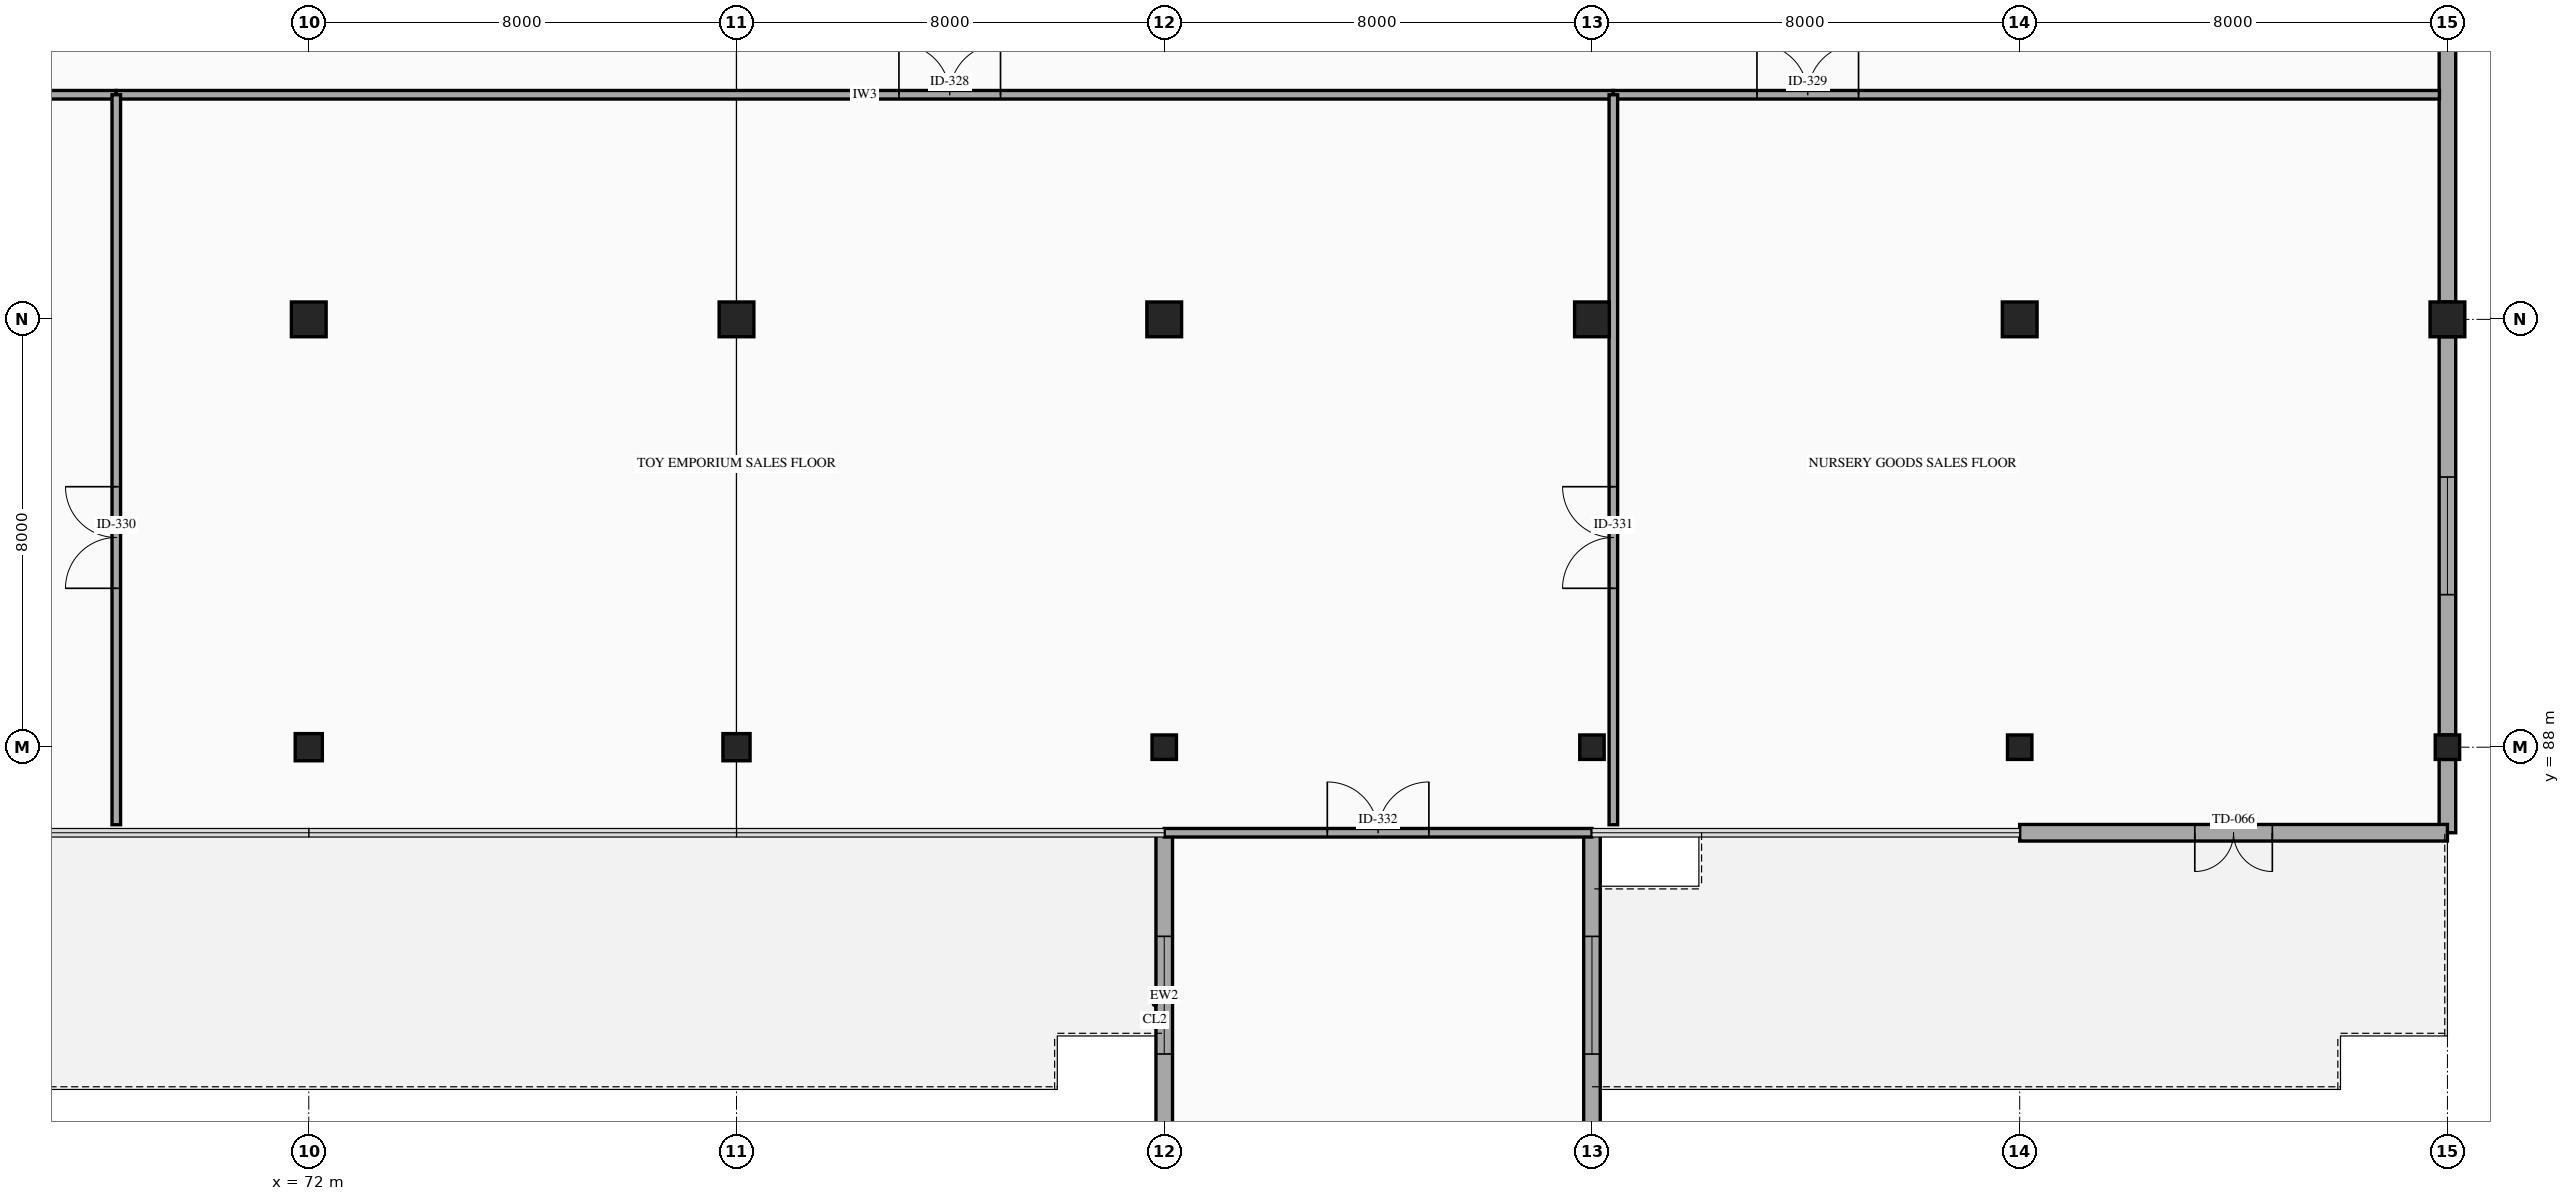
"""IFC4 building model, lengths in metres.
Left out: names, types, materials, properties, quantities, classifications, styles, units other than length and angle.
Written with IfcOpenShell. Run it as: python <this file> out.ifc"""

import sys

from ifc_helpers import new_model, si_unit, direction, frame, frame_2d, origin, origin_2d, place, context, subcontext, project, spatial, rectangle, hollow_circle, extrude, element, fill, save


model = new_model("IFC4")
c1 = context("Model", 3, precision=1e-05, world=origin(), true_north=direction((0.0, 1.0)))
c2 = subcontext(c1, "Body", "Model", "MODEL_VIEW")
j1 = project(units=[si_unit("LENGTHUNIT", "METRE"), si_unit("PLANEANGLEUNIT", "RADIAN")], contexts=[c1])
p1 = place(None, origin())
s1 = spatial("IfcSite", under=j1, at=p1, CompositionType="ELEMENT")
p2 = place(p1, origin())
s2 = spatial("IfcBuilding", under=s1, at=p2, CompositionType="ELEMENT")
p3 = place(p2, frame((0.0, 0.0, 14.9)))
s3 = spatial("IfcBuildingStorey", under=s2, at=p3, CompositionType="ELEMENT", Elevation=14.9)
p4 = place(p3, frame((72.0, 88.0, 0.0), z_axis=(0.0, 0.0, 1.0), x_axis=(1.0, 0.0, 0.0)))
e1 = element("IfcColumn", 1, at=p4, inside=s3, PredefinedType="COLUMN", context=c2, shape_type="SweptSolid", body=[
    extrude(hollow_circle(Radius=0.254, WallThickness=0.012, at=origin_2d()), origin(), (0.0, 0.0, 1.0), 4.5),
])
p5 = place(p3, frame((72.0, 96.0, 0.0), z_axis=(0.0, 0.0, 1.0), x_axis=(1.0, 0.0, 0.0)))
e2 = element("IfcColumn", 2, at=p5, inside=s3, PredefinedType="COLUMN", context=c2, shape_type="SweptSolid", body=[
    extrude(rectangle(XDim=0.65, YDim=0.65, at=origin_2d()), origin(), (0.0, 0.0, 1.0), 4.5),
])
p6 = place(p3, frame((80.0, 88.0, 0.0), z_axis=(0.0, 0.0, 1.0), x_axis=(1.0, 0.0, 0.0)))
e3 = element("IfcColumn", 3, at=p6, inside=s3, PredefinedType="COLUMN", context=c2, shape_type="SweptSolid", body=[
    extrude(hollow_circle(Radius=0.254, WallThickness=0.012, at=origin_2d()), origin(), (0.0, 0.0, 1.0), 4.5),
])
p7 = place(p3, frame((80.0, 96.0, 0.0), z_axis=(0.0, 0.0, 1.0), x_axis=(1.0, 0.0, 0.0)))
e4 = element("IfcColumn", 4, at=p7, inside=s3, PredefinedType="COLUMN", context=c2, shape_type="SweptSolid", body=[
    extrude(rectangle(XDim=0.65, YDim=0.65, at=origin_2d()), origin(), (0.0, 0.0, 1.0), 4.5),
])
p8 = place(p3, frame((88.0, 88.0, 0.0), z_axis=(0.0, 0.0, 1.0), x_axis=(1.0, 0.0, 0.0)))
e5 = element("IfcColumn", 5, at=p8, inside=s3, PredefinedType="COLUMN", context=c2, shape_type="SweptSolid", body=[
    extrude(hollow_circle(Radius=0.229, WallThickness=0.012, at=origin_2d()), origin(), (0.0, 0.0, 1.0), 4.5),
])
p9 = place(p3, frame((88.0, 96.0, 0.0), z_axis=(0.0, 0.0, 1.0), x_axis=(1.0, 0.0, 0.0)))
e6 = element("IfcColumn", 6, at=p9, inside=s3, PredefinedType="COLUMN", context=c2, shape_type="SweptSolid", body=[
    extrude(rectangle(XDim=0.65, YDim=0.65, at=origin_2d()), origin(), (0.0, 0.0, 1.0), 4.5),
])
p10 = place(p3, frame((96.0, 88.0, 0.0), z_axis=(0.0, 0.0, 1.0), x_axis=(1.0, 0.0, 0.0)))
e7 = element("IfcColumn", 7, at=p10, inside=s3, PredefinedType="COLUMN", context=c2, shape_type="SweptSolid", body=[
    extrude(hollow_circle(Radius=0.229, WallThickness=0.012, at=origin_2d()), origin(), (0.0, 0.0, 1.0), 4.5),
])
p11 = place(p3, frame((96.0, 96.0, 0.0), z_axis=(0.0, 0.0, 1.0), x_axis=(1.0, 0.0, 0.0)))
e8 = element("IfcColumn", 8, at=p11, inside=s3, PredefinedType="COLUMN", context=c2, shape_type="SweptSolid", body=[
    extrude(rectangle(XDim=0.65, YDim=0.65, at=origin_2d()), origin(), (0.0, 0.0, 1.0), 4.5),
])
p12 = place(p3, frame((104.0, 88.0, 0.0), z_axis=(0.0, 0.0, 1.0), x_axis=(1.0, 0.0, 0.0)))
e9 = element("IfcColumn", 9, at=p12, inside=s3, PredefinedType="COLUMN", context=c2, shape_type="SweptSolid", body=[
    extrude(hollow_circle(Radius=0.229, WallThickness=0.012, at=origin_2d()), origin(), (0.0, 0.0, 1.0), 4.5),
])
p13 = place(p3, frame((104.0, 96.0, 0.0), z_axis=(0.0, 0.0, 1.0), x_axis=(1.0, 0.0, 0.0)))
e10 = element("IfcColumn", 10, at=p13, inside=s3, PredefinedType="COLUMN", context=c2, shape_type="SweptSolid", body=[
    extrude(rectangle(XDim=0.65, YDim=0.65, at=origin_2d()), origin(), (0.0, 0.0, 1.0), 4.5),
])
p14 = place(p3, frame((112.0, 88.0, 0.0), z_axis=(0.0, 0.0, 1.0), x_axis=(1.0, 0.0, 0.0)))
e11 = element("IfcColumn", 11, at=p14, inside=s3, PredefinedType="COLUMN", context=c2, shape_type="SweptSolid", body=[
    extrude(hollow_circle(Radius=0.229, WallThickness=0.012, at=origin_2d()), origin(), (0.0, 0.0, 1.0), 4.5),
])
p15 = place(p3, frame((112.0, 96.0, 0.0), z_axis=(0.0, 0.0, 1.0), x_axis=(1.0, 0.0, 0.0)))
e12 = element("IfcColumn", 12, at=p15, inside=s3, PredefinedType="COLUMN", context=c2, shape_type="SweptSolid", body=[
    extrude(rectangle(XDim=0.65, YDim=0.65, at=origin_2d()), origin(), (0.0, 0.0, 1.0), 4.5),
])
p16 = place(p3, frame((88.0, 80.325, 0.0), z_axis=(0.0, 0.0, 1.0), x_axis=(0.0, 1.0, 0.0)))
e13 = element("IfcWall", 13, at=p16, inside=s3, PredefinedType="STANDARD", context=c2, shape_type="SweptSolid", body=[
    extrude(rectangle(XDim=6.075, YDim=0.31, at=frame_2d((3.038, 0.0))), origin(), (0.0, 0.0, 1.0), 3.48),
])
p17 = place(p16, frame((1.938, 0.0, 0.8)))
e14 = element("IfcOpeningElement", 14, at=p17, cuts=e13, PredefinedType="OPENING", context=c2, shape_type="SweptSolid", body=[
    extrude(rectangle(XDim=2.2, YDim=2.05, at=frame_2d((1.1, 1.025))), frame((0.0, 0.165, 0.0), z_axis=(0.0, -1.0, 0.0), x_axis=(1.0, 0.0, 0.0)), (0.0, 0.0, 1.0), 0.33),
])
p18 = place(p3, frame((112.0, 103.675, 0.0), z_axis=(0.0, 0.0, 1.0), x_axis=(0.0, -1.0, 0.0)))
e15 = element("IfcWall", 15, at=p18, inside=s3, PredefinedType="STANDARD", context=c2, shape_type="SweptSolid", body=[
    extrude(rectangle(XDim=7.35, YDim=0.31, at=frame_2d((3.675, 0.0))), origin(), (0.0, 0.0, 1.0), 3.48),
])
p19 = place(p3, frame((112.0, 95.675, 0.0), z_axis=(0.0, 0.0, 1.0), x_axis=(0.0, -1.0, 0.0)))
e16 = element("IfcWall", 16, at=p19, inside=s3, PredefinedType="STANDARD", context=c2, shape_type="SweptSolid", body=[
    extrude(rectangle(XDim=7.447, YDim=0.31, at=frame_2d((3.723, 0.0))), origin(), (0.0, 0.0, 1.0), 3.48),
])
p20 = place(p19, frame((2.623, 0.0, 0.8)))
e17 = element("IfcOpeningElement", 17, at=p20, cuts=e16, PredefinedType="OPENING", context=c2, shape_type="SweptSolid", body=[
    extrude(rectangle(XDim=2.2, YDim=2.05, at=frame_2d((1.1, 1.025))), frame((0.0, 0.165, 0.0), z_axis=(0.0, -1.0, 0.0), x_axis=(1.0, 0.0, 0.0)), (0.0, 0.0, 1.0), 0.33),
])
p21 = place(p3, frame((112.0, 87.771, 0.0), z_axis=(0.0, 0.0, 1.0), x_axis=(0.0, -1.0, 0.0)))
e18 = element("IfcWall", 18, at=p21, inside=s3, PredefinedType="STANDARD", context=c2, shape_type="SweptSolid", body=[
    extrude(rectangle(XDim=1.372, YDim=0.31, at=frame_2d((0.686, 0.0))), origin(), (0.0, 0.0, 1.0), 3.48),
])
p22 = place(p3, frame((112.0, 86.4, 0.0), z_axis=(0.0, 0.0, 1.0), x_axis=(-1.0, 0.0, 0.0)))
e19 = element("IfcWall", 19, at=p22, inside=s3, PredefinedType="STANDARD", context=c2, shape_type="SweptSolid", body=[
    extrude(rectangle(XDim=8.0, YDim=0.31, at=frame_2d((4.0, 0.0))), origin(), (0.0, 0.0, 1.0), 3.48),
])
p23 = place(p22, frame((3.275, 0.0, 0.0)))
e20 = element("IfcOpeningElement", 20, at=p23, cuts=e19, PredefinedType="OPENING", context=c2, shape_type="SweptSolid", body=[
    extrude(rectangle(XDim=1.45, YDim=2.1, at=frame_2d((0.725, 1.05))), frame((0.0, 0.165, 0.0), z_axis=(0.0, -1.0, 0.0), x_axis=(1.0, 0.0, 0.0)), (0.0, 0.0, 1.0), 0.33),
])
p24 = place(p3, frame((96.0, 86.4, 0.0), z_axis=(0.0, 0.0, 1.0), x_axis=(0.0, -1.0, 0.0)))
e21 = element("IfcWall", 21, at=p24, inside=s3, PredefinedType="STANDARD", context=c2, shape_type="SweptSolid", body=[
    extrude(rectangle(XDim=6.075, YDim=0.31, at=frame_2d((3.038, 0.0))), origin(), (0.0, 0.0, 1.0), 3.48),
])
p25 = place(p24, frame((1.938, 0.0, 0.8)))
e22 = element("IfcOpeningElement", 22, at=p25, cuts=e21, PredefinedType="OPENING", context=c2, shape_type="SweptSolid", body=[
    extrude(rectangle(XDim=2.2, YDim=2.05, at=frame_2d((1.1, 1.025))), frame((0.0, 0.165, 0.0), z_axis=(0.0, -1.0, 0.0), x_axis=(1.0, 0.0, 0.0)), (0.0, 0.0, 1.0), 0.33),
])
p26 = place(p3, frame((48.0, 100.2, 0.0), z_axis=(0.0, 0.0, 1.0), x_axis=(1.0, 0.0, 0.0)))
e23 = element("IfcWall", 23, at=p26, inside=s3, PredefinedType="PARTITIONING", context=c2, shape_type="SweptSolid", body=[
    extrude(rectangle(XDim=20.4, YDim=0.16, at=frame_2d((10.2, 0.0))), origin(), (0.0, 0.0, 1.0), 3.48),
])
p27 = place(p26, frame((11.091, 0.0, 0.0)))
e24 = element("IfcOpeningElement", 24, at=p27, cuts=e23, PredefinedType="OPENING", context=c2, shape_type="SweptSolid", body=[
    extrude(rectangle(XDim=1.9, YDim=2.3, at=frame_2d((0.95, 1.15))), frame((0.0, 0.09, 0.0), z_axis=(0.0, -1.0, 0.0), x_axis=(1.0, 0.0, 0.0)), (0.0, 0.0, 1.0), 0.18),
])
p28 = place(p3, frame((68.4, 100.2, 0.0), z_axis=(0.0, 0.0, 1.0), x_axis=(1.0, 0.0, 0.0)))
e25 = element("IfcWall", 25, at=p28, inside=s3, PredefinedType="PARTITIONING", context=c2, shape_type="SweptSolid", body=[
    extrude(rectangle(XDim=28.0, YDim=0.16, at=frame_2d((14.0, 0.0))), origin(), (0.0, 0.0, 1.0), 3.48),
])
p29 = place(p28, frame((14.638, 0.0, 0.0)))
e26 = element("IfcOpeningElement", 26, at=p29, cuts=e25, PredefinedType="OPENING", context=c2, shape_type="SweptSolid", body=[
    extrude(rectangle(XDim=1.9, YDim=2.3, at=frame_2d((0.95, 1.15))), frame((0.0, 0.09, 0.0), z_axis=(0.0, -1.0, 0.0), x_axis=(1.0, 0.0, 0.0)), (0.0, 0.0, 1.0), 0.18),
])
p30 = place(p3, frame((96.4, 100.2, 0.0), z_axis=(0.0, 0.0, 1.0), x_axis=(1.0, 0.0, 0.0)))
e27 = element("IfcWall", 27, at=p30, inside=s3, PredefinedType="PARTITIONING", context=c2, shape_type="SweptSolid", body=[
    extrude(rectangle(XDim=15.45, YDim=0.16, at=frame_2d((7.725, 0.0))), origin(), (0.0, 0.0, 1.0), 3.48),
])
p31 = place(p30, frame((2.686, 0.0, 0.0)))
e28 = element("IfcOpeningElement", 28, at=p31, cuts=e27, PredefinedType="OPENING", context=c2, shape_type="SweptSolid", body=[
    extrude(rectangle(XDim=1.9, YDim=2.3, at=frame_2d((0.95, 1.15))), frame((0.0, 0.09, 0.0), z_axis=(0.0, -1.0, 0.0), x_axis=(1.0, 0.0, 0.0)), (0.0, 0.0, 1.0), 0.18),
])
p32 = place(p3, frame((68.4, 86.55, 0.0), z_axis=(0.0, 0.0, 1.0), x_axis=(0.0, 1.0, 0.0)))
e29 = element("IfcWall", 29, at=p32, inside=s3, PredefinedType="PARTITIONING", context=c2, shape_type="SweptSolid", body=[
    extrude(rectangle(XDim=13.65, YDim=0.16, at=frame_2d((6.825, 0.0))), origin(), (0.0, 0.0, 1.0), 3.48),
])
p33 = place(p32, frame((4.421, 0.0, 0.0)))
e30 = element("IfcOpeningElement", 30, at=p33, cuts=e29, PredefinedType="OPENING", context=c2, shape_type="SweptSolid", body=[
    extrude(rectangle(XDim=1.9, YDim=2.3, at=frame_2d((0.95, 1.15))), frame((0.0, 0.09, 0.0), z_axis=(0.0, -1.0, 0.0), x_axis=(1.0, 0.0, 0.0)), (0.0, 0.0, 1.0), 0.18),
])
p34 = place(p3, frame((96.4, 86.55, 0.0), z_axis=(0.0, 0.0, 1.0), x_axis=(0.0, 1.0, 0.0)))
e31 = element("IfcWall", 31, at=p34, inside=s3, PredefinedType="PARTITIONING", context=c2, shape_type="SweptSolid", body=[
    extrude(rectangle(XDim=13.65, YDim=0.16, at=frame_2d((6.825, 0.0))), origin(), (0.0, 0.0, 1.0), 3.48),
])
p35 = place(p34, frame((4.421, 0.0, 0.0)))
e32 = element("IfcOpeningElement", 32, at=p35, cuts=e31, PredefinedType="OPENING", context=c2, shape_type="SweptSolid", body=[
    extrude(rectangle(XDim=1.9, YDim=2.3, at=frame_2d((0.95, 1.15))), frame((0.0, 0.09, 0.0), z_axis=(0.0, -1.0, 0.0), x_axis=(1.0, 0.0, 0.0)), (0.0, 0.0, 1.0), 0.18),
])
p36 = place(p3, frame((88.0, 86.4, 0.0), z_axis=(0.0, 0.0, 1.0), x_axis=(1.0, 0.0, 0.0)))
e33 = element("IfcWall", 33, at=p36, inside=s3, PredefinedType="PARTITIONING", context=c2, shape_type="SweptSolid", body=[
    extrude(rectangle(XDim=8.0, YDim=0.16, at=frame_2d((4.0, 0.0))), origin(), (0.0, 0.0, 1.0), 3.48),
])
p37 = place(p36, frame((3.05, 0.0, 0.0)))
e34 = element("IfcOpeningElement", 34, at=p37, cuts=e33, PredefinedType="OPENING", context=c2, shape_type="SweptSolid", body=[
    extrude(rectangle(XDim=1.9, YDim=2.3, at=frame_2d((0.95, 1.15))), frame((0.0, 0.09, 0.0), z_axis=(0.0, -1.0, 0.0), x_axis=(1.0, 0.0, 0.0)), (0.0, 0.0, 1.0), 0.18),
])
p38 = place(p17, origin())
e35 = element("IfcWindow", 35, at=p38, inside=s3, PartitioningType="DOUBLE_PANEL_VERTICAL", PredefinedType="WINDOW", context=c2, shape_type="SweptSolid", body=[
    extrude(rectangle(XDim=2.2, YDim=2.05, at=frame_2d((1.1, 1.025))), frame((0.0, 0.03, 0.0), z_axis=(0.0, -1.0, 0.0), x_axis=(1.0, 0.0, 0.0)), (0.0, 0.0, 1.0), 0.06),
])
fill(e14, e35)
p39 = place(p20, origin())
e36 = element("IfcWindow", 36, at=p39, inside=s3, PartitioningType="DOUBLE_PANEL_VERTICAL", PredefinedType="WINDOW", context=c2, shape_type="SweptSolid", body=[
    extrude(rectangle(XDim=2.2, YDim=2.05, at=frame_2d((1.1, 1.025))), frame((0.0, 0.03, 0.0), z_axis=(0.0, -1.0, 0.0), x_axis=(1.0, 0.0, 0.0)), (0.0, 0.0, 1.0), 0.06),
])
fill(e17, e36)
p40 = place(p23, origin())
e37 = element("IfcDoor", 37, at=p40, inside=s3, OperationType="DOUBLE_DOOR_SINGLE_SWING", PredefinedType="DOOR", context=c2, shape_type="SweptSolid", body=[
    extrude(rectangle(XDim=1.45, YDim=2.1, at=frame_2d((0.725, 1.05))), frame((0.0, 0.025, 0.0), z_axis=(0.0, -1.0, 0.0), x_axis=(1.0, 0.0, 0.0)), (0.0, 0.0, 1.0), 0.05),
])
fill(e20, e37)
p41 = place(p25, origin())
e38 = element("IfcWindow", 38, at=p41, inside=s3, PartitioningType="DOUBLE_PANEL_VERTICAL", PredefinedType="WINDOW", context=c2, shape_type="SweptSolid", body=[
    extrude(rectangle(XDim=2.2, YDim=2.05, at=frame_2d((1.1, 1.025))), frame((0.0, 0.03, 0.0), z_axis=(0.0, -1.0, 0.0), x_axis=(1.0, 0.0, 0.0)), (0.0, 0.0, 1.0), 0.06),
])
fill(e22, e38)
p42 = place(p29, origin())
e39 = element("IfcDoor", 39, at=p42, inside=s3, OperationType="DOUBLE_DOOR_SINGLE_SWING", PredefinedType="DOOR", context=c2, shape_type="SweptSolid", body=[
    extrude(rectangle(XDim=1.9, YDim=2.3, at=frame_2d((0.95, 1.15))), frame((0.0, 0.025, 0.0), z_axis=(0.0, -1.0, 0.0), x_axis=(1.0, 0.0, 0.0)), (0.0, 0.0, 1.0), 0.05),
])
fill(e26, e39)
p43 = place(p31, origin())
e40 = element("IfcDoor", 40, at=p43, inside=s3, OperationType="DOUBLE_DOOR_SINGLE_SWING", PredefinedType="DOOR", context=c2, shape_type="SweptSolid", body=[
    extrude(rectangle(XDim=1.9, YDim=2.3, at=frame_2d((0.95, 1.15))), frame((0.0, 0.025, 0.0), z_axis=(0.0, -1.0, 0.0), x_axis=(1.0, 0.0, 0.0)), (0.0, 0.0, 1.0), 0.05),
])
fill(e28, e40)
p44 = place(p33, origin())
e41 = element("IfcDoor", 41, at=p44, inside=s3, OperationType="DOUBLE_DOOR_SINGLE_SWING", PredefinedType="DOOR", context=c2, shape_type="SweptSolid", body=[
    extrude(rectangle(XDim=1.9, YDim=2.3, at=frame_2d((0.95, 1.15))), frame((0.0, 0.025, 0.0), z_axis=(0.0, -1.0, 0.0), x_axis=(1.0, 0.0, 0.0)), (0.0, 0.0, 1.0), 0.05),
])
fill(e30, e41)
p45 = place(p35, origin())
e42 = element("IfcDoor", 42, at=p45, inside=s3, OperationType="DOUBLE_DOOR_SINGLE_SWING", PredefinedType="DOOR", context=c2, shape_type="SweptSolid", body=[
    extrude(rectangle(XDim=1.9, YDim=2.3, at=frame_2d((0.95, 1.15))), frame((0.0, 0.025, 0.0), z_axis=(0.0, -1.0, 0.0), x_axis=(1.0, 0.0, 0.0)), (0.0, 0.0, 1.0), 0.05),
])
fill(e32, e42)
p46 = place(p37, origin())
e43 = element("IfcDoor", 43, at=p46, inside=s3, OperationType="DOUBLE_DOOR_SINGLE_SWING", PredefinedType="DOOR", context=c2, shape_type="SweptSolid", body=[
    extrude(rectangle(XDim=1.9, YDim=2.3, at=frame_2d((0.95, 1.15))), frame((0.0, 0.025, 0.0), z_axis=(0.0, -1.0, 0.0), x_axis=(1.0, 0.0, 0.0)), (0.0, 0.0, 1.0), 0.05),
])
fill(e34, e43)
save(model, sys.argv[1])
